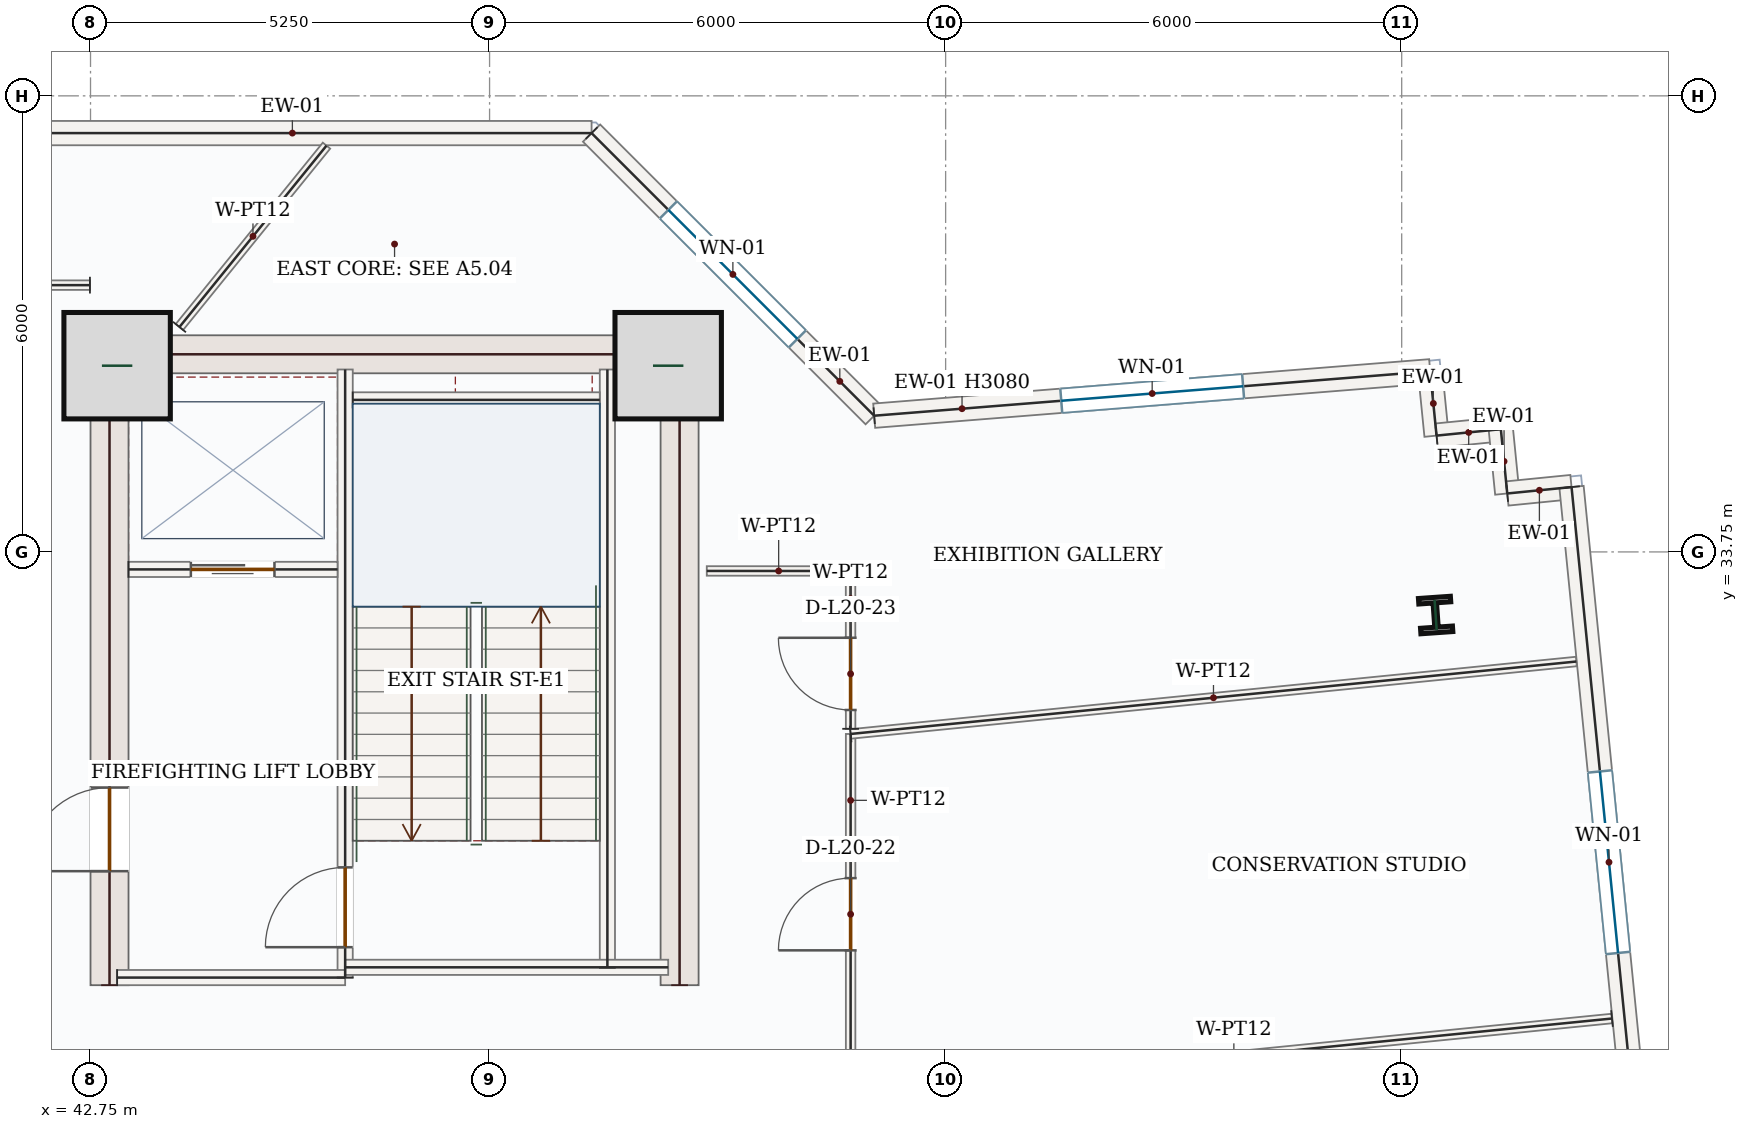
"""IFC4 building model, lengths in metres.
Left out: names, types, materials, properties, quantities, classifications, styles, units other than length and angle.
Written with IfcOpenShell. Run it as: python <this file> out.ifc"""

import sys

from ifc_helpers import new_model, si_unit, direction, frame, frame_2d, origin, origin_2d, place, context, subcontext, project, spatial, rectangle, i_section, extrude, source, transform, mapped, element, fill, save


model = new_model("IFC4")
c1 = context("Model", 3, precision=1e-05, world=origin(), true_north=direction((0.0, 1.0)))
c2 = subcontext(c1, "Body", "Model", "MODEL_VIEW")
j1 = project(units=[si_unit("LENGTHUNIT", "METRE"), si_unit("PLANEANGLEUNIT", "RADIAN")], contexts=[c1])
p1 = place(None, origin())
s1 = spatial("IfcSite", under=j1, at=p1, CompositionType="ELEMENT")
p2 = place(p1, origin())
s2 = spatial("IfcBuilding", under=s1, at=p2, CompositionType="ELEMENT")
p3 = place(p2, frame((0.0, 0.0, 92.1)))
s3 = spatial("IfcBuildingStorey", under=s2, at=p3, CompositionType="ELEMENT", Elevation=92.1)
p4 = place(p3, frame((43.0, 28.05, 0.0), z_axis=(0.0, 0.0, 1.0), x_axis=(0.0, 1.0, 0.0)))
e1 = element("IfcWall", 1, at=p4, inside=s3, PredefinedType="SHEAR", context=c2, shape_type="SweptSolid", body=[
    extrude(rectangle(XDim=8.55, YDim=0.5, at=frame_2d((4.275, 0.0))), origin(), (0.0, 0.0, 1.0), 3.95),
])
p5 = place(p4, frame((1.5, 0.0, 0.0)))
e2 = element("IfcOpeningElement", 2, at=p5, cuts=e1, PredefinedType="OPENING", context=c2, shape_type="SweptSolid", body=[
    extrude(rectangle(XDim=1.1, YDim=2.2, at=frame_2d((0.55, 1.1))), frame((0.0, 0.26, 0.0), z_axis=(0.0, -1.0, 0.0), x_axis=(1.0, 0.0, 0.0)), (0.0, 0.0, 1.0), 0.52),
])
m1 = source(origin(), c2, "Body", "SweptSolid", [
    extrude(rectangle(XDim=8.55, YDim=0.5, at=frame_2d((4.275, 0.0))), origin(), (0.0, 0.0, 1.0), 3.95),
])
p6 = place(p3, frame((50.5, 28.05, 0.0), z_axis=(0.0, 0.0, 1.0), x_axis=(0.0, 1.0, 0.0)))
e3 = element("IfcWall", 3, at=p6, inside=s3, PredefinedType="SHEAR", context=c2, shape_type="MappedRepresentation", body=[
    mapped(m1, transform((0.0, 0.0, 0.0), x_axis=(1.0, 0.0, 0.0), y_axis=(0.0, 1.0, 0.0), z_axis=(0.0, 0.0, 1.0), scale=1.0)),
])
m2 = source(origin(), c2, "Body", "SweptSolid", [
    extrude(rectangle(XDim=7.0, YDim=0.5, at=frame_2d((3.5, 0.0))), origin(), (0.0, 0.0, 1.0), 3.95),
])
p7 = place(p3, frame((43.25, 36.35, 0.0), z_axis=(0.0, 0.0, 1.0), x_axis=(1.0, 0.0, 0.0)))
e4 = element("IfcWall", 4, at=p7, inside=s3, PredefinedType="SHEAR", context=c2, shape_type="MappedRepresentation", body=[
    mapped(m2, transform((0.0, 0.0, 0.0), x_axis=(1.0, 0.0, 0.0), y_axis=(0.0, 1.0, 0.0), z_axis=(0.0, 0.0, 1.0), scale=1.0)),
])
m3 = source(origin(), c2, "Body", "SweptSolid", [
    extrude(rectangle(XDim=1.4, YDim=1.4, at=origin_2d()), origin(), (0.0, 0.0, 1.0), 4.2),
])
for number, where, z_axis, x_axis in (
    (5, (43.1, 36.2, 0.0), (0.0, 0.0, 1.0), (1.0, 0.0, 0.0)),
    (6, (50.35, 36.2, 0.0), (0.0, 0.0, 1.0), (1.0, 0.0, 0.0)),
):
    element("IfcColumn", number, at=place(p3, frame(where, z_axis=z_axis, x_axis=x_axis)), inside=s3, PredefinedType="COLUMN", context=c2, shape_type="MappedRepresentation", body=[
        mapped(m3, transform((0.0, 0.0, 0.0), x_axis=(1.0, 0.0, 0.0), y_axis=(0.0, 1.0, 0.0), z_axis=(0.0, 0.0, 1.0), scale=1.0)),
    ])
m4 = source(origin(), c2, "Body", "SweptSolid", [
    extrude(i_section(OverallWidth=0.421, OverallDepth=0.465, WebThickness=0.045, FlangeThickness=0.073, FilletRadius=0.018, at=origin_2d()), origin(), (0.0, 0.0, 1.0), 4.2),
])
p8 = place(p3, frame((60.447, 32.92, 0.0), z_axis=(0.0, 0.0, 1.0), x_axis=(0.99756405026, 0.069756473744, 0.0)))
e7 = element("IfcColumn", 7, at=p8, inside=s3, PredefinedType="COLUMN", context=c2, shape_type="MappedRepresentation", body=[
    mapped(m4, transform((0.0, 0.0, 0.0), x_axis=(1.0, 0.0, 0.0), y_axis=(0.0, 1.0, 0.0), z_axis=(0.0, 0.0, 1.0), scale=1.0)),
])
m5 = source(origin(), c2, "Body", "SweptSolid", [
    extrude(rectangle(XDim=7.873, YDim=0.32, at=frame_2d((3.936, 0.0))), origin(), (0.0, 0.0, 1.0), 3.95),
])
p9 = place(p3, frame((41.469, 39.26, 0.0), z_axis=(0.0, 0.0, 1.0), x_axis=(1.0, 0.0, 0.0)))
e8 = element("IfcWall", 8, at=p9, inside=s3, PredefinedType="SOLIDWALL", context=c2, shape_type="MappedRepresentation", body=[
    mapped(m5, transform((0.0, 0.0, 0.0), x_axis=(1.0, 0.0, 0.0), y_axis=(0.0, 1.0, 0.0), z_axis=(0.0, 0.0, 1.0), scale=1.0)),
])
p10 = place(p3, frame((49.342, 39.26, 0.0), z_axis=(0.0, 0.0, 1.0), x_axis=(0.707106781187, -0.707106781187, 0.0)))
e9 = element("IfcWall", 9, at=p10, inside=s3, PredefinedType="SOLIDWALL", context=c2, shape_type="SweptSolid", body=[
    extrude(rectangle(XDim=5.258, YDim=0.32, at=frame_2d((2.629, 0.0))), origin(), (0.0, 0.0, 1.0), 3.95),
])
p11 = place(p10, frame((1.429, 0.0, 0.85)))
e10 = element("IfcOpeningElement", 10, at=p11, cuts=e9, PredefinedType="OPENING", context=c2, shape_type="SweptSolid", body=[
    extrude(rectangle(XDim=2.4, YDim=1.8, at=frame_2d((1.2, 0.9))), frame((0.0, 0.17, 0.0), z_axis=(0.0, -1.0, 0.0), x_axis=(1.0, 0.0, 0.0)), (0.0, 0.0, 1.0), 0.34),
])
p12 = place(p3, frame((53.06, 35.542, 0.0), z_axis=(0.0, 0.0, 1.0), x_axis=(0.996827539556, 0.079591811023, 0.0)))
e11 = element("IfcWall", 11, at=p12, inside=s3, PredefinedType="SOLIDWALL", context=c2, shape_type="SweptSolid", body=[
    extrude(rectangle(XDim=7.337, YDim=0.32, at=frame_2d((3.668, 0.0))), origin(), (0.0, 0.0, 1.0), 3.08),
])
p13 = place(p12, frame((2.469, 0.0, 0.85)))
e12 = element("IfcOpeningElement", 12, at=p13, cuts=e11, PredefinedType="OPENING", context=c2, shape_type="SweptSolid", body=[
    extrude(rectangle(XDim=2.4, YDim=1.8, at=frame_2d((1.2, 0.9))), frame((0.0, 0.17, 0.0), z_axis=(0.0, -1.0, 0.0), x_axis=(1.0, 0.0, 0.0)), (0.0, 0.0, 1.0), 0.34),
])
m6 = source(origin(), c2, "Body", "SweptSolid", [
    extrude(rectangle(XDim=0.85, YDim=0.32, at=frame_2d((0.425, 0.0))), origin(), (0.0, 0.0, 1.0), 3.95),
])
p14 = place(p3, frame((60.374, 36.126, 0.0), z_axis=(0.0, 0.0, 1.0), x_axis=(0.09938995433, -0.995048560111, 0.0)))
e13 = element("IfcWall", 13, at=p14, inside=s3, PredefinedType="SOLIDWALL", context=c2, shape_type="MappedRepresentation", body=[
    mapped(m6, transform((0.0, 0.0, 0.0), x_axis=(1.0, 0.0, 0.0), y_axis=(0.0, 1.0, 0.0), z_axis=(0.0, 0.0, 1.0), scale=1.0)),
])
m7 = source(origin(), c2, "Body", "SweptSolid", [
    extrude(rectangle(XDim=0.85, YDim=0.32, at=frame_2d((0.425, 0.0))), origin(), (0.0, 0.0, 1.0), 3.95),
])
p15 = place(p3, frame((60.458, 35.28, 0.0), z_axis=(0.0, 0.0, 1.0), x_axis=(0.995079749343, 0.09907720448, 0.0)))
e14 = element("IfcWall", 14, at=p15, inside=s3, PredefinedType="SOLIDWALL", context=c2, shape_type="MappedRepresentation", body=[
    mapped(m7, transform((0.0, 0.0, 0.0), x_axis=(1.0, 0.0, 0.0), y_axis=(0.0, 1.0, 0.0), z_axis=(0.0, 0.0, 1.0), scale=1.0)),
])
for number, where, z_axis, x_axis in (
    (15, (61.304, 35.365, 0.0), (0.0, 0.0, 1.0), (0.099, -0.995, 0.0)),
    (16, (61.389, 34.519, 0.0), (0.0, 0.0, 1.0), (0.995, 0.099, 0.0)),
):
    element("IfcWall", number, at=place(p3, frame(where, z_axis=z_axis, x_axis=x_axis)), inside=s3, PredefinedType="SOLIDWALL", context=c2, shape_type="MappedRepresentation", body=[
        mapped(m6, transform((0.0, 0.0, 0.0), x_axis=(1.0, 0.0, 0.0), y_axis=(0.0, 1.0, 0.0), z_axis=(0.0, 0.0, 1.0), scale=1.0)),
    ])
p16 = place(p3, frame((62.235, 34.603, 0.0), z_axis=(0.0, 0.0, 1.0), x_axis=(0.099303907908, -0.995057151059, 0.0)))
e17 = element("IfcWall", 17, at=p16, inside=s3, PredefinedType="SOLIDWALL", context=c2, shape_type="SweptSolid", body=[
    extrude(rectangle(XDim=9.92, YDim=0.32, at=frame_2d((4.96, 0.0))), origin(), (0.0, 0.0, 1.0), 3.95),
])
p17 = place(p16, frame((3.76, 0.0, 0.85)))
e18 = element("IfcOpeningElement", 18, at=p17, cuts=e17, PredefinedType="OPENING", context=c2, shape_type="SweptSolid", body=[
    extrude(rectangle(XDim=2.4, YDim=1.8, at=frame_2d((1.2, 0.9))), frame((0.0, 0.17, 0.0), z_axis=(0.0, -1.0, 0.0), x_axis=(1.0, 0.0, 0.0)), (0.0, 0.0, 1.0), 0.34),
])
m8 = source(origin(), c2, "Body", "SweptSolid", [
    extrude(rectangle(XDim=7.87, YDim=0.2, at=frame_2d((3.935, 0.0))), origin(), (0.0, 0.0, 1.0), 3.95),
])
p18 = place(p3, frame((49.55, 28.28, 0.0), z_axis=(0.0, 0.0, 1.0), x_axis=(0.0, 1.0, 0.0)))
e19 = element("IfcWall", 19, at=p18, inside=s3, PredefinedType="SOLIDWALL", context=c2, shape_type="MappedRepresentation", body=[
    mapped(m8, transform((0.0, 0.0, 0.0), x_axis=(1.0, 0.0, 0.0), y_axis=(0.0, 1.0, 0.0), z_axis=(0.0, 0.0, 1.0), scale=1.0)),
])
p19 = place(p3, frame((46.1, 28.15, 0.0), z_axis=(0.0, 0.0, 1.0), x_axis=(0.0, 1.0, 0.0)))
e20 = element("IfcWall", 20, at=p19, inside=s3, PredefinedType="SOLIDWALL", context=c2, shape_type="SweptSolid", body=[
    extrude(rectangle(XDim=8.0, YDim=0.2, at=frame_2d((4.0, 0.0))), origin(), (0.0, 0.0, 1.0), 3.95),
])
p20 = place(p19, frame((0.4, 0.0, 0.0)))
e21 = element("IfcOpeningElement", 21, at=p20, cuts=e20, PredefinedType="OPENING", context=c2, shape_type="SweptSolid", body=[
    extrude(rectangle(XDim=1.05, YDim=2.15, at=frame_2d((0.525, 1.075))), frame((0.0, 0.11, 0.0), z_axis=(0.0, -1.0, 0.0), x_axis=(1.0, 0.0, 0.0)), (0.0, 0.0, 1.0), 0.22),
])
m9 = source(origin(), c2, "Body", "SweptSolid", [
    extrude(rectangle(XDim=3.0, YDim=0.2, at=frame_2d((1.5, 0.0))), origin(), (0.0, 0.0, 1.0), 3.95),
])
p21 = place(p3, frame((43.1, 28.15, 0.0), z_axis=(0.0, 0.0, 1.0), x_axis=(1.0, 0.0, 0.0)))
e22 = element("IfcWall", 22, at=p21, inside=s3, PredefinedType="SOLIDWALL", context=c2, shape_type="MappedRepresentation", body=[
    mapped(m9, transform((0.0, 0.0, 0.0), x_axis=(1.0, 0.0, 0.0), y_axis=(0.0, 1.0, 0.0), z_axis=(0.0, 0.0, 1.0), scale=1.0)),
])
m10 = source(origin(), c2, "Body", "SweptSolid", [
    extrude(rectangle(XDim=4.25, YDim=0.2, at=frame_2d((2.125, 0.0))), origin(), (0.0, 0.0, 1.0), 3.95),
])
p22 = place(p3, frame((46.1, 28.285, 0.0), z_axis=(0.0, 0.0, 1.0), x_axis=(1.0, 0.0, 0.0)))
e23 = element("IfcWall", 23, at=p22, inside=s3, PredefinedType="SOLIDWALL", context=c2, shape_type="MappedRepresentation", body=[
    mapped(m10, transform((0.0, 0.0, 0.0), x_axis=(1.0, 0.0, 0.0), y_axis=(0.0, 1.0, 0.0), z_axis=(0.0, 0.0, 1.0), scale=1.0)),
])
m11 = source(origin(), c2, "Body", "SweptSolid", [
    extrude(rectangle(XDim=3.25, YDim=0.2, at=frame_2d((1.625, 0.0))), origin(), (0.0, 0.0, 1.0), 3.95),
])
p23 = place(p3, frame((46.2, 35.75, 0.0), z_axis=(0.0, 0.0, 1.0), x_axis=(1.0, 0.0, 0.0)))
e24 = element("IfcWall", 24, at=p23, inside=s3, PredefinedType="SOLIDWALL", context=c2, shape_type="MappedRepresentation", body=[
    mapped(m11, transform((0.0, 0.0, 0.0), x_axis=(1.0, 0.0, 0.0), y_axis=(0.0, 1.0, 0.0), z_axis=(0.0, 0.0, 1.0), scale=1.0)),
])
p24 = place(p3, frame((43.25, 33.52, 0.0), z_axis=(0.0, 0.0, 1.0), x_axis=(1.0, 0.0, 0.0)))
e25 = element("IfcWall", 25, at=p24, inside=s3, PredefinedType="SOLIDWALL", context=c2, shape_type="SweptSolid", body=[
    extrude(rectangle(XDim=2.75, YDim=0.2, at=frame_2d((1.375, 0.0))), origin(), (0.0, 0.0, 1.0), 3.95),
])
p25 = place(p24, frame((0.82, 0.0, 0.0)))
e26 = element("IfcOpeningElement", 26, at=p25, cuts=e25, PredefinedType="OPENING", context=c2, shape_type="SweptSolid", body=[
    extrude(rectangle(XDim=1.1, YDim=2.15, at=frame_2d((0.55, 1.075))), frame((0.0, 0.11, 0.0), z_axis=(0.0, -1.0, 0.0), x_axis=(1.0, 0.0, 0.0)), (0.0, 0.0, 1.0), 0.22),
])
p26 = place(p3, frame((52.75, 26.612, 0.0), z_axis=(0.0, 0.0, 1.0), x_axis=(0.0, 1.0, 0.0)))
e27 = element("IfcWall", 27, at=p26, inside=s3, PredefinedType="PARTITIONING", context=c2, shape_type="SweptSolid", body=[
    extrude(rectangle(XDim=4.743, YDim=0.125, at=frame_2d((2.372, 0.0))), origin(), (0.0, 0.0, 1.0), 3.95),
])
p27 = place(p26, frame((1.897, 0.0, 0.0)))
e28 = element("IfcOpeningElement", 28, at=p27, cuts=e27, PredefinedType="OPENING", context=c2, shape_type="SweptSolid", body=[
    extrude(rectangle(XDim=0.95, YDim=2.15, at=frame_2d((0.475, 1.075))), frame((0.0, 0.073, 0.0), z_axis=(0.0, -1.0, 0.0), x_axis=(1.0, 0.0, 0.0)), (0.0, 0.0, 1.0), 0.145),
])
m12 = source(origin(), c2, "Body", "SweptSolid", [
    extrude(rectangle(XDim=9.595, YDim=0.125, at=frame_2d((4.798, 0.0))), origin(), (0.0, 0.0, 1.0), 3.95),
])
p28 = place(p3, frame((52.75, 31.355, 0.0), z_axis=(0.0, 0.0, 1.0), x_axis=(0.995054305912, 0.099332413068, 0.0)))
e29 = element("IfcWall", 29, at=p28, inside=s3, PredefinedType="PARTITIONING", context=c2, shape_type="MappedRepresentation", body=[
    mapped(m12, transform((0.0, 0.0, 0.0), x_axis=(1.0, 0.0, 0.0), y_axis=(0.0, 1.0, 0.0), z_axis=(0.0, 0.0, 1.0), scale=1.0)),
])
m13 = source(origin(), c2, "Body", "SweptSolid", [
    extrude(rectangle(XDim=9.999, YDim=0.125, at=frame_2d((5.0, 0.0))), origin(), (0.0, 0.0, 1.0), 3.95),
])
p29 = place(p3, frame((62.767, 27.612, 0.0), z_axis=(0.0, 0.0, 1.0), x_axis=(-0.995054581391, -0.099329653443, 0.0)))
e30 = element("IfcWall", 30, at=p29, inside=s3, PredefinedType="PARTITIONING", context=c2, shape_type="MappedRepresentation", body=[
    mapped(m13, transform((0.0, 0.0, 0.0), x_axis=(1.0, 0.0, 0.0), y_axis=(0.0, 1.0, 0.0), z_axis=(0.0, 0.0, 1.0), scale=1.0)),
])
m14 = source(origin(), c2, "Body", "SweptSolid", [
    extrude(rectangle(XDim=3.072, YDim=0.125, at=frame_2d((1.536, 0.0))), origin(), (0.0, 0.0, 1.0), 3.95),
])
p30 = place(p3, frame((43.92, 36.709, 0.0), z_axis=(0.0, 0.0, 1.0), x_axis=(0.629760486176, 0.776789373029, 0.0)))
e31 = element("IfcWall", 31, at=p30, inside=s3, PredefinedType="PARTITIONING", context=c2, shape_type="MappedRepresentation", body=[
    mapped(m14, transform((0.0, 0.0, 0.0), x_axis=(1.0, 0.0, 0.0), y_axis=(0.0, 1.0, 0.0), z_axis=(0.0, 0.0, 1.0), scale=1.0)),
])
p31 = place(p3, frame((52.75, 31.423, 0.0), z_axis=(0.0, 0.0, 1.0), x_axis=(-0.000470366834, 0.999999889378, 0.0)))
e32 = element("IfcWall", 32, at=p31, inside=s3, PredefinedType="PARTITIONING", context=c2, shape_type="SweptSolid", body=[
    extrude(rectangle(XDim=2.076, YDim=0.125, at=frame_2d((1.038, 0.0))), origin(), (0.0, 0.0, 1.0), 3.95),
])
p32 = place(p31, frame((0.248, 0.0, 0.0)))
e33 = element("IfcOpeningElement", 33, at=p32, cuts=e32, PredefinedType="OPENING", context=c2, shape_type="SweptSolid", body=[
    extrude(rectangle(XDim=0.95, YDim=2.15, at=frame_2d((0.475, 1.075))), frame((0.0, 0.073, 0.0), z_axis=(0.0, -1.0, 0.0), x_axis=(1.0, 0.0, 0.0)), (0.0, 0.0, 1.0), 0.145),
])
m15 = source(origin(), c2, "Body", "SweptSolid", [
    extrude(rectangle(XDim=1.891, YDim=0.125, at=frame_2d((0.946, 0.0))), origin(), (0.0, 0.0, 1.0), 3.95),
])
p33 = place(p3, frame((52.749, 33.499, 0.0), z_axis=(0.0, 0.0, 1.0), x_axis=(-0.99999992502, 0.000387246647, 0.0)))
e34 = element("IfcWall", 34, at=p33, inside=s3, PredefinedType="PARTITIONING", context=c2, shape_type="MappedRepresentation", body=[
    mapped(m15, transform((0.0, 0.0, 0.0), x_axis=(1.0, 0.0, 0.0), y_axis=(0.0, 1.0, 0.0), z_axis=(0.0, 0.0, 1.0), scale=1.0)),
])
p34 = place(p3, frame((42.742, 37.26, 0.0), z_axis=(0.0, 0.0, 1.0), x_axis=(-0.999999999078, 4.2935039e-05, 0.0)))
e35 = element("IfcWall", 35, at=p34, inside=s3, PredefinedType="PARTITIONING", context=c2, shape_type="SweptSolid", body=[
    extrude(rectangle(XDim=5.686, YDim=0.125, at=frame_2d((2.843, 0.0))), origin(), (0.0, 0.0, 1.0), 3.95),
])
p35 = place(p34, frame((3.694, 0.0, 0.0)))
e36 = element("IfcOpeningElement", 36, at=p35, cuts=e35, PredefinedType="OPENING", context=c2, shape_type="SweptSolid", body=[
    extrude(rectangle(XDim=0.95, YDim=2.15, at=frame_2d((0.475, 1.075))), frame((0.0, 0.073, 0.0), z_axis=(0.0, -1.0, 0.0), x_axis=(1.0, 0.0, 0.0)), (0.0, 0.0, 1.0), 0.145),
])
m16 = source(origin(), c2, "Body", "SweptSolid", [
    extrude(rectangle(XDim=2.4, YDim=1.8, at=frame_2d((1.2, 0.9))), frame((0.0, 0.03, 0.0), z_axis=(0.0, -1.0, 0.0), x_axis=(1.0, 0.0, 0.0)), (0.0, 0.0, 1.0), 0.06),
])
p36 = place(p11, origin())
e37 = element("IfcWindow", 37, at=p36, inside=s3, PartitioningType="DOUBLE_PANEL_VERTICAL", PredefinedType="WINDOW", context=c2, shape_type="MappedRepresentation", body=[
    mapped(m16, transform((0.0, 0.0, 0.0), x_axis=(1.0, 0.0, 0.0), y_axis=(0.0, 1.0, 0.0), z_axis=(0.0, 0.0, 1.0), scale=1.0)),
])
fill(e10, e37)
p37 = place(p13, origin())
e38 = element("IfcWindow", 38, at=p37, inside=s3, PartitioningType="DOUBLE_PANEL_VERTICAL", PredefinedType="WINDOW", context=c2, shape_type="MappedRepresentation", body=[
    mapped(m16, transform((0.0, 0.0, 0.0), x_axis=(1.0, 0.0, 0.0), y_axis=(0.0, 1.0, 0.0), z_axis=(0.0, 0.0, 1.0), scale=1.0)),
])
fill(e12, e38)
p38 = place(p17, origin())
e39 = element("IfcWindow", 39, at=p38, inside=s3, PartitioningType="DOUBLE_PANEL_VERTICAL", PredefinedType="WINDOW", context=c2, shape_type="MappedRepresentation", body=[
    mapped(m16, transform((0.0, 0.0, 0.0), x_axis=(1.0, 0.0, 0.0), y_axis=(0.0, 1.0, 0.0), z_axis=(0.0, 0.0, 1.0), scale=1.0)),
])
fill(e18, e39)
m17 = source(origin(), c2, "Body", "SweptSolid", [
    extrude(rectangle(XDim=1.05, YDim=2.15, at=frame_2d((0.525, 1.075))), frame((0.0, 0.025, 0.0), z_axis=(0.0, -1.0, 0.0), x_axis=(1.0, 0.0, 0.0)), (0.0, 0.0, 1.0), 0.05),
])
p39 = place(p20, origin())
e40 = element("IfcDoor", 40, at=p39, inside=s3, OperationType="SINGLE_SWING_LEFT", PredefinedType="DOOR", context=c2, shape_type="MappedRepresentation", body=[
    mapped(m17, transform((0.0, 0.0, 0.0), x_axis=(1.0, 0.0, 0.0), y_axis=(0.0, 1.0, 0.0), z_axis=(0.0, 0.0, 1.0), scale=1.0)),
])
fill(e21, e40)
m18 = source(origin(), c2, "Body", "SweptSolid", [
    extrude(rectangle(XDim=1.1, YDim=2.15, at=frame_2d((0.55, 1.075))), frame((0.0, 0.025, 0.0), z_axis=(0.0, -1.0, 0.0), x_axis=(1.0, 0.0, 0.0)), (0.0, 0.0, 1.0), 0.05),
])
p40 = place(p25, origin())
e41 = element("IfcDoor", 41, at=p40, inside=s3, OperationType="DOUBLE_DOOR_SLIDING", PredefinedType="DOOR", context=c2, shape_type="MappedRepresentation", body=[
    mapped(m18, transform((0.0, 0.0, 0.0), x_axis=(1.0, 0.0, 0.0), y_axis=(0.0, 1.0, 0.0), z_axis=(0.0, 0.0, 1.0), scale=1.0)),
])
fill(e26, e41)
m19 = source(origin(), c2, "Body", "SweptSolid", [
    extrude(rectangle(XDim=1.1, YDim=2.2, at=frame_2d((0.55, 1.1))), frame((0.0, 0.025, 0.0), z_axis=(0.0, -1.0, 0.0), x_axis=(1.0, 0.0, 0.0)), (0.0, 0.0, 1.0), 0.05),
])
p41 = place(p5, origin())
e42 = element("IfcDoor", 42, at=p41, inside=s3, OperationType="SINGLE_SWING_LEFT", PredefinedType="DOOR", context=c2, shape_type="MappedRepresentation", body=[
    mapped(m19, transform((0.0, 0.0, 0.0), x_axis=(1.0, 0.0, 0.0), y_axis=(0.0, 1.0, 0.0), z_axis=(0.0, 0.0, 1.0), scale=1.0)),
])
fill(e2, e42)
m20 = source(origin(), c2, "Body", "SweptSolid", [
    extrude(rectangle(XDim=0.95, YDim=2.15, at=frame_2d((0.475, 1.075))), frame((0.0, 0.025, 0.0), z_axis=(0.0, -1.0, 0.0), x_axis=(1.0, 0.0, 0.0)), (0.0, 0.0, 1.0), 0.05),
])
p42 = place(p27, origin())
e43 = element("IfcDoor", 43, at=p42, inside=s3, OperationType="SINGLE_SWING_LEFT", PredefinedType="DOOR", context=c2, shape_type="MappedRepresentation", body=[
    mapped(m20, transform((0.0, 0.0, 0.0), x_axis=(1.0, 0.0, 0.0), y_axis=(0.0, 1.0, 0.0), z_axis=(0.0, 0.0, 1.0), scale=1.0)),
])
fill(e28, e43)
p43 = place(p32, origin())
e44 = element("IfcDoor", 44, at=p43, inside=s3, OperationType="SINGLE_SWING_RIGHT", PredefinedType="DOOR", context=c2, shape_type="MappedRepresentation", body=[
    mapped(m20, transform((0.0, 0.0, 0.0), x_axis=(1.0, 0.0, 0.0), y_axis=(0.0, 1.0, 0.0), z_axis=(0.0, 0.0, 1.0), scale=1.0)),
])
fill(e33, e44)
save(model, sys.argv[1])
